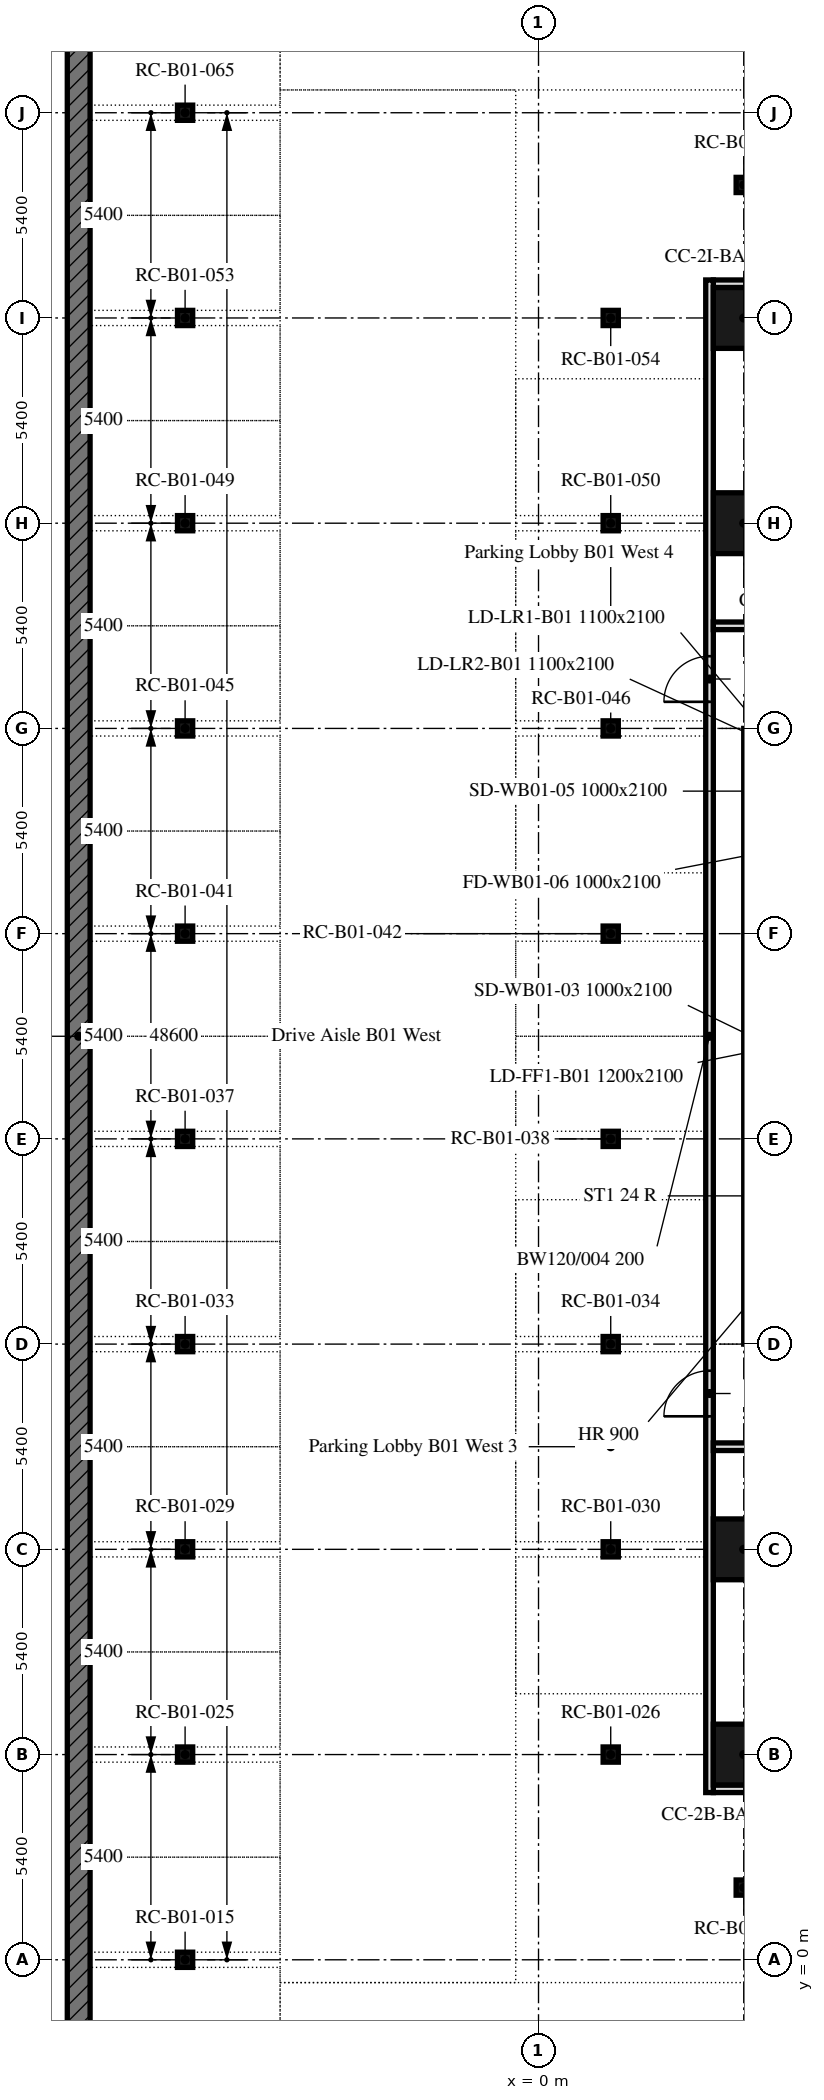
"""IFC4 building model, lengths in metres.
Left out: names, types, materials, properties, quantities, classifications, styles, units other than length and angle.
Written with IfcOpenShell. Run it as: python <this file> out.ifc"""

import sys

from ifc_helpers import new_model, si_unit, direction, frame, frame_2d, origin, origin_2d, place, context, subcontext, project, spatial, rectangle, extrude, element, fill, save


model = new_model("IFC4")
c1 = context("Model", 3, precision=1e-05, world=origin(), true_north=direction((0.0, 1.0)))
c2 = subcontext(c1, "Body", "Model", "MODEL_VIEW")
j1 = project(units=[si_unit("LENGTHUNIT", "METRE"), si_unit("PLANEANGLEUNIT", "RADIAN")], contexts=[c1])
p1 = place(None, origin())
s1 = spatial("IfcSite", under=j1, at=p1, CompositionType="ELEMENT")
p2 = place(p1, origin())
s2 = spatial("IfcBuilding", under=s1, at=p2, CompositionType="ELEMENT")
p3 = place(p2, frame((0.0, 0.0, -4.5)))
s3 = spatial("IfcBuildingStorey", under=s2, at=p3, CompositionType="ELEMENT", Elevation=-4.5)
p4 = place(p3, frame((-12.1, -12.4, 0.0), z_axis=(0.0, 0.0, 1.0), x_axis=(0.0, 1.0, 0.0)))
e1 = element("IfcWall", 1, at=p4, inside=s3, PredefinedType="SOLIDWALL", context=c2, shape_type="SweptSolid", body=[
    extrude(rectangle(XDim=73.4, YDim=0.6, at=frame_2d((36.7, 0.0))), origin(), (0.0, 0.0, 1.0), 4.0),
])
for number, where, z_axis, x_axis in (
    (2, (5.4, 5.4, 0.0), (0.0, 0.0, 1.0), (1.0, 0.0, 0.0)),
    (3, (5.4, 10.8, 0.0), (0.0, 0.0, 1.0), (1.0, 0.0, 0.0)),
    (4, (5.4, 37.8, 0.0), (0.0, 0.0, 1.0), (1.0, 0.0, 0.0)),
    (5, (5.4, 43.2, 0.0), (0.0, 0.0, 1.0), (1.0, 0.0, 0.0)),
):
    element("IfcColumn", number, at=place(p3, frame(where, z_axis=z_axis, x_axis=x_axis)), inside=s3, PredefinedType="COLUMN", context=c2, shape_type="SweptSolid", body=[
        extrude(rectangle(XDim=1.6, YDim=1.6, at=origin_2d()), origin(), (0.0, 0.0, 1.0), 4.0),
    ])
for number, where, z_axis, x_axis in (
    (6, (-9.3, 0.0, 0.0), (0.0, 0.0, 1.0), (1.0, 0.0, 0.0)),
    (7, (5.4, 1.9, 0.0), (0.0, 0.0, 1.0), (1.0, 0.0, 0.0)),
    (8, (-9.3, 5.4, 0.0), (0.0, 0.0, 1.0), (1.0, 0.0, 0.0)),
    (9, (1.9, 5.4, 0.0), (0.0, 0.0, 1.0), (1.0, 0.0, 0.0)),
    (10, (-9.3, 10.8, 0.0), (0.0, 0.0, 1.0), (1.0, 0.0, 0.0)),
    (11, (1.9, 10.8, 0.0), (0.0, 0.0, 1.0), (1.0, 0.0, 0.0)),
    (12, (-9.3, 16.2, 0.0), (0.0, 0.0, 1.0), (1.0, 0.0, 0.0)),
    (13, (1.9, 16.2, 0.0), (0.0, 0.0, 1.0), (1.0, 0.0, 0.0)),
    (14, (-9.3, 21.6, 0.0), (0.0, 0.0, 1.0), (1.0, 0.0, 0.0)),
    (15, (1.9, 21.6, 0.0), (0.0, 0.0, 1.0), (1.0, 0.0, 0.0)),
    (16, (-9.3, 27.0, 0.0), (0.0, 0.0, 1.0), (1.0, 0.0, 0.0)),
    (17, (1.9, 27.0, 0.0), (0.0, 0.0, 1.0), (1.0, 0.0, 0.0)),
    (18, (-9.3, 32.4, 0.0), (0.0, 0.0, 1.0), (1.0, 0.0, 0.0)),
    (19, (1.9, 32.4, 0.0), (0.0, 0.0, 1.0), (1.0, 0.0, 0.0)),
    (20, (-9.3, 37.8, 0.0), (0.0, 0.0, 1.0), (1.0, 0.0, 0.0)),
    (21, (1.9, 37.8, 0.0), (0.0, 0.0, 1.0), (1.0, 0.0, 0.0)),
    (22, (-9.3, 43.2, 0.0), (0.0, 0.0, 1.0), (1.0, 0.0, 0.0)),
    (23, (1.9, 43.2, 0.0), (0.0, 0.0, 1.0), (1.0, 0.0, 0.0)),
    (24, (5.4, 46.7, 0.0), (0.0, 0.0, 1.0), (1.0, 0.0, 0.0)),
    (25, (-9.3, 48.6, 0.0), (0.0, 0.0, 1.0), (1.0, 0.0, 0.0)),
):
    element("IfcColumn", number, at=place(p3, frame(where, z_axis=z_axis, x_axis=x_axis)), inside=s3, PredefinedType="COLUMN", context=c2, shape_type="SweptSolid", body=[
        extrude(rectangle(XDim=0.4, YDim=0.4, at=origin_2d()), origin(), (0.0, 0.0, 1.0), 4.0),
    ])
p5 = place(p3, frame((4.6, 4.5, 0.0), z_axis=(0.0, 0.0, 1.0), x_axis=(1.0, 0.0, 0.0)))
e26 = element("IfcWall", 26, at=p5, inside=s3, PredefinedType="PARTITIONING", context=c2, shape_type="SweptSolid", body=[
    extrude(rectangle(XDim=39.4, YDim=0.2, at=frame_2d((19.7, 0.0))), origin(), (0.0, 0.0, 1.0), 4.0),
])
p6 = place(p5, frame((18.3, 0.0, 0.0)))
e27 = element("IfcOpeningElement", 27, at=p6, cuts=e26, PredefinedType="OPENING", context=c2, shape_type="SweptSolid", body=[
    extrude(rectangle(XDim=1.2, YDim=2.1, at=frame_2d((0.6, 1.05))), frame((0.0, 0.11, 0.0), z_axis=(0.0, -1.0, 0.0), x_axis=(1.0, 0.0, 0.0)), (0.0, 0.0, 1.0), 0.22),
])
p7 = place(p3, frame((4.6, 44.1, 0.0), z_axis=(0.0, 0.0, 1.0), x_axis=(1.0, 0.0, 0.0)))
e28 = element("IfcWall", 28, at=p7, inside=s3, PredefinedType="PARTITIONING", context=c2, shape_type="SweptSolid", body=[
    extrude(rectangle(XDim=39.4, YDim=0.2, at=frame_2d((19.7, 0.0))), origin(), (0.0, 0.0, 1.0), 4.0),
])
p8 = place(p7, frame((23.4, 0.0, 0.0)))
e29 = element("IfcOpeningElement", 29, at=p8, cuts=e28, PredefinedType="OPENING", context=c2, shape_type="SweptSolid", body=[
    extrude(rectangle(XDim=1.2, YDim=2.1, at=frame_2d((0.6, 1.05))), frame((0.0, 0.11, 0.0), z_axis=(0.0, -1.0, 0.0), x_axis=(1.0, 0.0, 0.0)), (0.0, 0.0, 1.0), 0.22),
])
p9 = place(p3, frame((4.5, 4.4, 0.0), z_axis=(0.0, 0.0, 1.0), x_axis=(0.0, 1.0, 0.0)))
e30 = element("IfcWall", 30, at=p9, inside=s3, PredefinedType="PARTITIONING", context=c2, shape_type="SweptSolid", body=[
    extrude(rectangle(XDim=39.8, YDim=0.2, at=frame_2d((19.9, 0.0))), origin(), (0.0, 0.0, 1.0), 4.0),
])
p10 = place(p9, frame((9.9, 0.0, 0.0)))
e31 = element("IfcOpeningElement", 31, at=p10, cuts=e30, PredefinedType="OPENING", context=c2, shape_type="SweptSolid", body=[
    extrude(rectangle(XDim=1.2, YDim=2.1, at=frame_2d((0.6, 1.05))), frame((0.0, 0.11, 0.0), z_axis=(0.0, -1.0, 0.0), x_axis=(1.0, 0.0, 0.0)), (0.0, 0.0, 1.0), 0.22),
])
p11 = place(p9, frame((28.7, 0.0, 0.0)))
e32 = element("IfcOpeningElement", 32, at=p11, cuts=e30, PredefinedType="OPENING", context=c2, shape_type="SweptSolid", body=[
    extrude(rectangle(XDim=1.2, YDim=2.1, at=frame_2d((0.6, 1.05))), frame((0.0, 0.11, 0.0), z_axis=(0.0, -1.0, 0.0), x_axis=(1.0, 0.0, 0.0)), (0.0, 0.0, 1.0), 0.22),
])
p12 = place(p3, frame((4.6, 13.5, 0.0), z_axis=(0.0, 0.0, 1.0), x_axis=(1.0, 0.0, 0.0)))
e33 = element("IfcWall", 33, at=p12, inside=s3, PredefinedType="PARTITIONING", context=c2, shape_type="SweptSolid", body=[
    extrude(rectangle(XDim=14.2, YDim=0.2, at=frame_2d((7.1, 0.0))), origin(), (0.0, 0.0, 1.0), 4.0),
])
p13 = place(p12, frame((6.6, 0.0, 0.0)))
e34 = element("IfcOpeningElement", 34, at=p13, cuts=e33, PredefinedType="OPENING", context=c2, shape_type="SweptSolid", body=[
    extrude(rectangle(XDim=1.0, YDim=2.1, at=frame_2d((0.5, 1.05))), frame((0.0, 0.11, 0.0), z_axis=(0.0, -1.0, 0.0), x_axis=(1.0, 0.0, 0.0)), (0.0, 0.0, 1.0), 0.22),
])
p14 = place(p3, frame((4.6, 35.1, 0.0), z_axis=(0.0, 0.0, 1.0), x_axis=(1.0, 0.0, 0.0)))
e35 = element("IfcWall", 35, at=p14, inside=s3, PredefinedType="PARTITIONING", context=c2, shape_type="SweptSolid", body=[
    extrude(rectangle(XDim=14.2, YDim=0.2, at=frame_2d((7.1, 0.0))), origin(), (0.0, 0.0, 1.0), 4.0),
])
p15 = place(p14, frame((6.6, 0.0, 0.0)))
e36 = element("IfcOpeningElement", 36, at=p15, cuts=e35, PredefinedType="OPENING", context=c2, shape_type="SweptSolid", body=[
    extrude(rectangle(XDim=1.0, YDim=2.1, at=frame_2d((0.5, 1.05))), frame((0.0, 0.11, 0.0), z_axis=(0.0, -1.0, 0.0), x_axis=(1.0, 0.0, 0.0)), (0.0, 0.0, 1.0), 0.22),
])
p16 = place(p10, origin())
e37 = element("IfcDoor", 37, at=p16, inside=s3, OperationType="SINGLE_SWING_LEFT", PredefinedType="DOOR", context=c2, shape_type="SweptSolid", body=[
    extrude(rectangle(XDim=1.2, YDim=2.1, at=frame_2d((0.6, 1.05))), frame((0.0, 0.025, 0.0), z_axis=(0.0, -1.0, 0.0), x_axis=(1.0, 0.0, 0.0)), (0.0, 0.0, 1.0), 0.05),
])
fill(e31, e37)
p17 = place(p11, origin())
e38 = element("IfcDoor", 38, at=p17, inside=s3, OperationType="SINGLE_SWING_LEFT", PredefinedType="DOOR", context=c2, shape_type="SweptSolid", body=[
    extrude(rectangle(XDim=1.2, YDim=2.1, at=frame_2d((0.6, 1.05))), frame((0.0, 0.025, 0.0), z_axis=(0.0, -1.0, 0.0), x_axis=(1.0, 0.0, 0.0)), (0.0, 0.0, 1.0), 0.05),
])
fill(e32, e38)
save(model, sys.argv[1])
